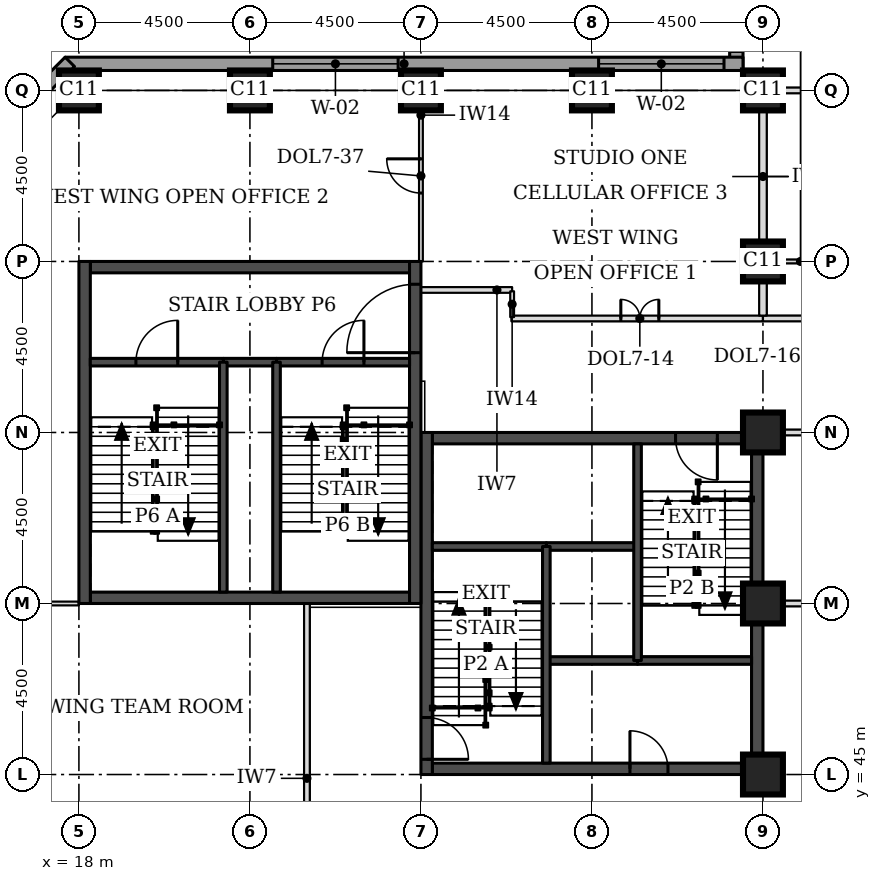
"""IFC4 building model, lengths in metres.
Left out: names, types, materials, properties, quantities, classifications, styles, units other than length and angle.
Written with IfcOpenShell. Run it as: python <this file> out.ifc"""

import sys

from ifc_helpers import new_model, si_unit, direction, frame, frame_2d, origin, origin_2d, place, context, subcontext, project, spatial, rectangle, extrude, element, fill, save


model = new_model("IFC4")
c1 = context("Model", 3, precision=1e-05, world=origin(), true_north=direction((0.0, 1.0)))
c2 = subcontext(c1, "Body", "Model", "MODEL_VIEW")
j1 = project(units=[si_unit("LENGTHUNIT", "METRE"), si_unit("PLANEANGLEUNIT", "RADIAN")], contexts=[c1])
p1 = place(None, origin())
s1 = spatial("IfcSite", under=j1, at=p1, CompositionType="ELEMENT")
p2 = place(p1, origin())
s2 = spatial("IfcBuilding", under=s1, at=p2, CompositionType="ELEMENT")
p3 = place(p2, frame((0.0, 0.0, 130.7)))
s3 = spatial("IfcBuildingStorey", under=s2, at=p3, CompositionType="ELEMENT", Elevation=130.7)
for number, where, z_axis, x_axis in (
    (1, (36.0, 45.0, 0.0), (0.0, 0.0, 1.0), (1.0, 0.0, 0.0)),
    (2, (36.0, 49.5, 0.0), (0.0, 0.0, 1.0), (1.0, 0.0, 0.0)),
    (3, (36.0, 54.0, 0.0), (0.0, 0.0, 1.0), (1.0, 0.0, 0.0)),
    (4, (36.0, 58.5, 0.0), (0.0, 0.0, 1.0), (1.0, 0.0, 0.0)),
    (5, (18.0, 63.0, 0.0), (0.0, 0.0, 1.0), (1.0, 0.0, 0.0)),
    (6, (22.5, 63.0, 0.0), (0.0, 0.0, 1.0), (1.0, 0.0, 0.0)),
    (7, (27.0, 63.0, 0.0), (0.0, 0.0, 1.0), (1.0, 0.0, 0.0)),
    (8, (31.5, 63.0, 0.0), (0.0, 0.0, 1.0), (1.0, 0.0, 0.0)),
    (9, (36.0, 63.0, 0.0), (0.0, 0.0, 1.0), (1.0, 0.0, 0.0)),
):
    element("IfcColumn", number, at=place(p3, frame(where, z_axis=z_axis, x_axis=x_axis)), inside=s3, PredefinedType="COLUMN", context=c2, shape_type="SweptSolid", body=[
        extrude(rectangle(XDim=1.05, YDim=1.05, at=origin_2d()), origin(), (0.0, 0.0, 1.0), 3.7),
    ])
p4 = place(p3, frame((27.3, 45.15, 0.0), z_axis=(0.0, 0.0, 1.0), x_axis=(1.0, 0.0, 0.0)))
e10 = element("IfcWall", 10, at=p4, inside=s3, PredefinedType="SHEAR", context=c2, shape_type="SweptSolid", body=[
    extrude(rectangle(XDim=8.4, YDim=0.3, at=frame_2d((4.2, 0.0))), origin(), (0.0, 0.0, 1.0), 3.7),
])
p5 = place(p4, frame((5.2, 0.0, 0.0)))
e11 = element("IfcOpeningElement", 11, at=p5, cuts=e10, PredefinedType="OPENING", context=c2, shape_type="SweptSolid", body=[
    extrude(rectangle(XDim=1.0, YDim=2.1, at=frame_2d((0.5, 1.05))), frame((0.0, 0.16, 0.0), z_axis=(0.0, -1.0, 0.0), x_axis=(1.0, 0.0, 0.0)), (0.0, 0.0, 1.0), 0.32),
])
p6 = place(p3, frame((27.3, 53.85, 0.0), z_axis=(0.0, 0.0, 1.0), x_axis=(1.0, 0.0, 0.0)))
e12 = element("IfcWall", 12, at=p6, inside=s3, PredefinedType="SHEAR", context=c2, shape_type="SweptSolid", body=[
    extrude(rectangle(XDim=8.4, YDim=0.3, at=frame_2d((4.2, 0.0))), origin(), (0.0, 0.0, 1.0), 3.7),
])
p7 = place(p6, frame((6.4, 0.0, 0.0)))
e13 = element("IfcOpeningElement", 13, at=p7, cuts=e12, PredefinedType="OPENING", context=c2, shape_type="SweptSolid", body=[
    extrude(rectangle(XDim=1.1, YDim=2.1, at=frame_2d((0.55, 1.05))), frame((0.0, 0.16, 0.0), z_axis=(0.0, -1.0, 0.0), x_axis=(1.0, 0.0, 0.0)), (0.0, 0.0, 1.0), 0.32),
])
p8 = place(p3, frame((27.15, 45.0, 0.0), z_axis=(0.0, 0.0, 1.0), x_axis=(0.0, 1.0, 0.0)))
e14 = element("IfcWall", 14, at=p8, inside=s3, PredefinedType="SHEAR", context=c2, shape_type="SweptSolid", body=[
    extrude(rectangle(XDim=9.0, YDim=0.3, at=frame_2d((4.5, 0.0))), origin(), (0.0, 0.0, 1.0), 3.7),
])
p9 = place(p8, frame((0.4, 0.0, 0.0)))
e15 = element("IfcOpeningElement", 15, at=p9, cuts=e14, PredefinedType="OPENING", context=c2, shape_type="SweptSolid", body=[
    extrude(rectangle(XDim=1.1, YDim=2.1, at=frame_2d((0.55, 1.05))), frame((0.0, 0.16, 0.0), z_axis=(0.0, -1.0, 0.0), x_axis=(1.0, 0.0, 0.0)), (0.0, 0.0, 1.0), 0.32),
])
p10 = place(p3, frame((35.85, 45.0, 0.0), z_axis=(0.0, 0.0, 1.0), x_axis=(0.0, 1.0, 0.0)))
e16 = element("IfcWall", 16, at=p10, inside=s3, PredefinedType="SHEAR", context=c2, shape_type="SweptSolid", body=[
    extrude(rectangle(XDim=9.0, YDim=0.3, at=frame_2d((4.5, 0.0))), origin(), (0.0, 0.0, 1.0), 3.7),
])
for number, where, z_axis, x_axis in (
    (17, (18.3, 49.65, 0.0), (0.0, 0.0, 1.0), (1.0, 0.0, 0.0)),
    (18, (18.3, 58.35, 0.0), (0.0, 0.0, 1.0), (1.0, 0.0, 0.0)),
):
    element("IfcWall", number, at=place(p3, frame(where, z_axis=z_axis, x_axis=x_axis)), inside=s3, PredefinedType="SHEAR", context=c2, shape_type="SweptSolid", body=[
        extrude(rectangle(XDim=8.4, YDim=0.3, at=frame_2d((4.2, 0.0))), origin(), (0.0, 0.0, 1.0), 3.7),
    ])
p11 = place(p3, frame((18.15, 49.5, 0.0), z_axis=(0.0, 0.0, 1.0), x_axis=(0.0, 1.0, 0.0)))
e19 = element("IfcWall", 19, at=p11, inside=s3, PredefinedType="SHEAR", context=c2, shape_type="SweptSolid", body=[
    extrude(rectangle(XDim=9.0, YDim=0.3, at=frame_2d((4.5, 0.0))), origin(), (0.0, 0.0, 1.0), 3.7),
])
p12 = place(p3, frame((26.85, 49.5, 0.0), z_axis=(0.0, 0.0, 1.0), x_axis=(0.0, 1.0, 0.0)))
e20 = element("IfcWall", 20, at=p12, inside=s3, PredefinedType="SHEAR", context=c2, shape_type="SweptSolid", body=[
    extrude(rectangle(XDim=9.0, YDim=0.3, at=frame_2d((4.5, 0.0))), origin(), (0.0, 0.0, 1.0), 3.7),
])
p13 = place(p12, frame((6.6, 0.0, 0.0)))
e21 = element("IfcOpeningElement", 21, at=p13, cuts=e20, PredefinedType="OPENING", context=c2, shape_type="SweptSolid", body=[
    extrude(rectangle(XDim=1.8, YDim=2.1, at=frame_2d((0.9, 1.05))), frame((0.0, 0.16, 0.0), z_axis=(0.0, -1.0, 0.0), x_axis=(1.0, 0.0, 0.0)), (0.0, 0.0, 1.0), 0.32),
])
p14 = place(p3, frame((35.3, 76.862, 0.0), z_axis=(0.0, 0.0, 1.0), x_axis=(0.0, -1.0, 0.0)))
e22 = element("IfcWall", 22, at=p14, inside=s3, PredefinedType="STANDARD", context=c2, shape_type="SweptSolid", body=[
    extrude(rectangle(XDim=13.337, YDim=0.35, at=frame_2d((6.669, 0.0))), origin(), (0.0, 0.0, 1.0), 3.525),
])
p15 = place(p14, frame((9.537, 0.0, 0.9)))
e23 = element("IfcOpeningElement", 23, at=p15, cuts=e22, PredefinedType="OPENING", context=c2, shape_type="SweptSolid", body=[
    extrude(rectangle(XDim=3.3, YDim=1.9, at=frame_2d((1.65, 0.95))), frame((0.0, 0.185, 0.0), z_axis=(0.0, -1.0, 0.0), x_axis=(1.0, 0.0, 0.0)), (0.0, 0.0, 1.0), 0.37),
])
p16 = place(p3, frame((35.475, 63.7, 0.0), z_axis=(0.0, 0.0, 1.0), x_axis=(-1.0, 0.0, 0.0)))
e24 = element("IfcWall", 24, at=p16, inside=s3, PredefinedType="STANDARD", context=c2, shape_type="SweptSolid", body=[
    extrude(rectangle(XDim=17.837, YDim=0.35, at=frame_2d((8.919, 0.0))), origin(), (0.0, 0.0, 1.0), 3.525),
])
p17 = place(p16, frame((0.5, 0.0, 0.9)))
e25 = element("IfcOpeningElement", 25, at=p17, cuts=e24, PredefinedType="OPENING", context=c2, shape_type="SweptSolid", body=[
    extrude(rectangle(XDim=3.3, YDim=1.9, at=frame_2d((1.65, 0.95))), frame((0.0, 0.185, 0.0), z_axis=(0.0, -1.0, 0.0), x_axis=(1.0, 0.0, 0.0)), (0.0, 0.0, 1.0), 0.37),
])
p18 = place(p16, frame((9.075, 0.0, 0.9)))
e26 = element("IfcOpeningElement", 26, at=p18, cuts=e24, PredefinedType="OPENING", context=c2, shape_type="SweptSolid", body=[
    extrude(rectangle(XDim=3.3, YDim=1.9, at=frame_2d((1.65, 0.95))), frame((0.0, 0.185, 0.0), z_axis=(0.0, -1.0, 0.0), x_axis=(1.0, 0.0, 0.0)), (0.0, 0.0, 1.0), 0.37),
])
p19 = place(p3, frame((17.761, 63.751, 0.0), z_axis=(0.0, 0.0, 1.0), x_axis=(-0.707106781187, -0.707106781187, 0.0)))
e27 = element("IfcWall", 27, at=p19, inside=s3, PredefinedType="STANDARD", context=c2, shape_type="SweptSolid", body=[
    extrude(rectangle(XDim=7.089, YDim=0.35, at=frame_2d((3.544, 0.0))), origin(), (0.0, 0.0, 1.0), 3.525),
])
p20 = place(p19, frame((1.894, 0.0, 0.9)))
e28 = element("IfcOpeningElement", 28, at=p20, cuts=e27, PredefinedType="OPENING", context=c2, shape_type="SweptSolid", body=[
    extrude(rectangle(XDim=3.3, YDim=1.9, at=frame_2d((1.65, 0.95))), frame((0.0, 0.185, 0.0), z_axis=(0.0, -1.0, 0.0), x_axis=(1.0, 0.0, 0.0)), (0.0, 0.0, 1.0), 0.37),
])
p21 = place(p3, frame((12.749, 44.761, 0.0), z_axis=(0.0, 0.0, 1.0), x_axis=(0.707106781187, -0.707106781187, 0.0)))
e29 = element("IfcWall", 29, at=p21, inside=s3, PredefinedType="STANDARD", context=c2, shape_type="SweptSolid", body=[
    extrude(rectangle(XDim=7.089, YDim=0.35, at=frame_2d((3.544, 0.0))), origin(), (0.0, 0.0, 1.0), 3.525),
])
p22 = place(p21, frame((1.894, 0.0, 0.9)))
e30 = element("IfcOpeningElement", 30, at=p22, cuts=e29, PredefinedType="OPENING", context=c2, shape_type="SweptSolid", body=[
    extrude(rectangle(XDim=3.3, YDim=1.9, at=frame_2d((1.65, 0.95))), frame((0.0, 0.185, 0.0), z_axis=(0.0, -1.0, 0.0), x_axis=(1.0, 0.0, 0.0)), (0.0, 0.0, 1.0), 0.37),
])
for number, where, z_axis, x_axis in (
    (31, (36.525, 49.5, 0.0), (0.0, 0.0, 1.0), (1.0, 0.0, 0.0)),
    (32, (36.525, 54.0, 0.0), (0.0, 0.0, 1.0), (1.0, 0.0, 0.0)),
):
    element("IfcWall", number, at=place(p3, frame(where, z_axis=z_axis, x_axis=x_axis)), inside=s3, PredefinedType="PARTITIONING", context=c2, shape_type="SweptSolid", body=[
        extrude(rectangle(XDim=5.55, YDim=0.15, at=frame_2d((2.775, 0.0))), origin(), (0.0, 0.0, 1.0), 3.55),
    ])
p23 = place(p3, frame((29.38, 57.0, 0.0), z_axis=(0.0, 0.0, 1.0), x_axis=(1.0, 0.0, 0.0)))
e33 = element("IfcWall", 33, at=p23, inside=s3, PredefinedType="PARTITIONING", context=c2, shape_type="SweptSolid", body=[
    extrude(rectangle(XDim=6.62, YDim=0.15, at=frame_2d((3.31, 0.0))), origin(), (0.0, 0.0, 1.0), 3.55),
])
p24 = place(p23, frame((2.88, 0.0, 0.0)))
e34 = element("IfcOpeningElement", 34, at=p24, cuts=e33, PredefinedType="OPENING", context=c2, shape_type="SweptSolid", body=[
    extrude(rectangle(XDim=1.0, YDim=2.1, at=frame_2d((0.5, 1.05))), frame((0.0, 0.085, 0.0), z_axis=(0.0, -1.0, 0.0), x_axis=(1.0, 0.0, 0.0)), (0.0, 0.0, 1.0), 0.17),
])
p25 = place(p3, frame((36.0, 57.0, 0.0), z_axis=(0.0, 0.0, 1.0), x_axis=(1.0, 0.0, 0.0)))
e35 = element("IfcWall", 35, at=p25, inside=s3, PredefinedType="PARTITIONING", context=c2, shape_type="SweptSolid", body=[
    extrude(rectangle(XDim=6.075, YDim=0.15, at=frame_2d((3.038, 0.0))), origin(), (0.0, 0.0, 1.0), 3.55),
])
p26 = place(p25, frame((2.55, 0.0, 0.0)))
e36 = element("IfcOpeningElement", 36, at=p26, cuts=e35, PredefinedType="OPENING", context=c2, shape_type="SweptSolid", body=[
    extrude(rectangle(XDim=1.0, YDim=2.1, at=frame_2d((0.5, 1.05))), frame((0.0, 0.085, 0.0), z_axis=(0.0, -1.0, 0.0), x_axis=(1.0, 0.0, 0.0)), (0.0, 0.0, 1.0), 0.17),
])
p27 = place(p3, frame((36.525, 58.5, 0.0), z_axis=(0.0, 0.0, 1.0), x_axis=(1.0, 0.0, 0.0)))
e37 = element("IfcWall", 37, at=p27, inside=s3, PredefinedType="PARTITIONING", context=c2, shape_type="SweptSolid", body=[
    extrude(rectangle(XDim=2.525, YDim=0.1, at=frame_2d((1.263, 0.0))), origin(), (0.0, 0.0, 1.0), 3.55),
])
p28 = place(p27, frame((0.8, 0.0, 0.0)))
e38 = element("IfcOpeningElement", 38, at=p28, cuts=e37, PredefinedType="OPENING", context=c2, shape_type="SweptSolid", body=[
    extrude(rectangle(XDim=0.9, YDim=2.1, at=frame_2d((0.45, 1.05))), frame((0.0, 0.06, 0.0), z_axis=(0.0, -1.0, 0.0), x_axis=(1.0, 0.0, 0.0)), (0.0, 0.0, 1.0), 0.12),
])
p29 = place(p3, frame((36.525, 63.0, 0.0), z_axis=(0.0, 0.0, 1.0), x_axis=(1.0, 0.0, 0.0)))
e39 = element("IfcWall", 39, at=p29, inside=s3, PredefinedType="PARTITIONING", context=c2, shape_type="SweptSolid", body=[
    extrude(rectangle(XDim=2.4, YDim=0.15, at=frame_2d((1.2, 0.0))), origin(), (0.0, 0.0, 1.0), 3.55),
])
p30 = place(p3, frame((24.0, 43.5, 0.0), z_axis=(0.0, 0.0, 1.0), x_axis=(0.0, 1.0, 0.0)))
e40 = element("IfcWall", 40, at=p30, inside=s3, PredefinedType="PARTITIONING", context=c2, shape_type="SweptSolid", body=[
    extrude(rectangle(XDim=6.0, YDim=0.15, at=frame_2d((3.0, 0.0))), origin(), (0.0, 0.0, 1.0), 3.55),
])
p31 = place(p3, frame((36.0, 57.075, 0.0), z_axis=(0.0, 0.0, 1.0), x_axis=(0.0, 1.0, 0.0)))
e41 = element("IfcWall", 41, at=p31, inside=s3, PredefinedType="PARTITIONING", context=c2, shape_type="SweptSolid", body=[
    extrude(rectangle(XDim=0.9, YDim=0.2, at=frame_2d((0.45, 0.0))), origin(), (0.0, 0.0, 1.0), 2.8),
])
p32 = place(p3, frame((36.0, 58.995, 0.0), z_axis=(0.0, 0.0, 1.0), x_axis=(0.0, 1.0, 0.0)))
e42 = element("IfcWall", 42, at=p32, inside=s3, PredefinedType="PARTITIONING", context=c2, shape_type="SweptSolid", body=[
    extrude(rectangle(XDim=3.48, YDim=0.2, at=frame_2d((1.74, 0.0))), origin(), (0.0, 0.0, 1.0), 2.8),
])
p33 = place(p3, frame((27.0, 63.0, 0.0), z_axis=(0.0, 0.0, 1.0), x_axis=(0.0, -1.0, 0.0)))
e43 = element("IfcWall", 43, at=p33, inside=s3, PredefinedType="PARTITIONING", context=c2, shape_type="SweptSolid", body=[
    extrude(rectangle(XDim=4.5, YDim=0.1, at=frame_2d((2.25, 0.0))), origin(), (0.0, 0.0, 1.0), 3.55),
])
p34 = place(p33, frame((1.8, 0.0, 0.0)))
e44 = element("IfcOpeningElement", 44, at=p34, cuts=e43, PredefinedType="OPENING", context=c2, shape_type="SweptSolid", body=[
    extrude(rectangle(XDim=0.9, YDim=2.1, at=frame_2d((0.45, 1.05))), frame((0.0, 0.06, 0.0), z_axis=(0.0, -1.0, 0.0), x_axis=(1.0, 0.0, 0.0)), (0.0, 0.0, 1.0), 0.12),
])
p35 = place(p3, frame((13.5, 49.5, 0.0), z_axis=(0.0, 0.0, 1.0), x_axis=(1.0, 0.0, 0.0)))
e45 = element("IfcWall", 45, at=p35, inside=s3, PredefinedType="PARTITIONING", context=c2, shape_type="SweptSolid", body=[
    extrude(rectangle(XDim=4.5, YDim=0.1, at=frame_2d((2.25, 0.0))), origin(), (0.0, 0.0, 1.0), 3.55),
])
p36 = place(p35, frame((1.8, 0.0, 0.0)))
e46 = element("IfcOpeningElement", 46, at=p36, cuts=e45, PredefinedType="OPENING", context=c2, shape_type="SweptSolid", body=[
    extrude(rectangle(XDim=0.9, YDim=2.1, at=frame_2d((0.45, 1.05))), frame((0.0, 0.06, 0.0), z_axis=(0.0, -1.0, 0.0), x_axis=(1.0, 0.0, 0.0)), (0.0, 0.0, 1.0), 0.12),
])
p37 = place(p3, frame((27.0, 57.75, 0.0), z_axis=(0.0, 0.0, 1.0), x_axis=(1.0, 0.0, 0.0)))
e47 = element("IfcWall", 47, at=p37, inside=s3, PredefinedType="PARTITIONING", context=c2, shape_type="SweptSolid", body=[
    extrude(rectangle(XDim=2.4, YDim=0.15, at=frame_2d((1.2, 0.0))), origin(), (0.0, 0.0, 1.0), 3.55),
])
p38 = place(p3, frame((29.4, 57.715, 0.0), z_axis=(0.0, 0.0, 1.0), x_axis=(0.0, -1.0, 0.0)))
e48 = element("IfcWall", 48, at=p38, inside=s3, PredefinedType="PARTITIONING", context=c2, shape_type="SweptSolid", body=[
    extrude(rectangle(XDim=0.68, YDim=0.1, at=frame_2d((0.34, 0.0))), origin(), (0.0, 0.0, 1.0), 3.55),
])
p39 = place(p3, frame((30.3, 48.0, 0.0), z_axis=(0.0, 0.0, 1.0), x_axis=(1.0, 0.0, 0.0)))
e49 = element("IfcWall", 49, at=p39, inside=s3, PredefinedType="SOLIDWALL", context=c2, shape_type="SweptSolid", body=[
    extrude(rectangle(XDim=2.4, YDim=0.2, at=frame_2d((1.2, 0.0))), origin(), (0.0, 0.0, 1.0), 3.55),
])
p40 = place(p3, frame((32.7, 48.0, 0.0), z_axis=(0.0, 0.0, 1.0), x_axis=(1.0, 0.0, 0.0)))
e50 = element("IfcWall", 50, at=p40, inside=s3, PredefinedType="SOLIDWALL", context=c2, shape_type="SweptSolid", body=[
    extrude(rectangle(XDim=3.0, YDim=0.2, at=frame_2d((1.5, 0.0))), origin(), (0.0, 0.0, 1.0), 3.55),
])
p41 = place(p3, frame((30.3, 51.0, 0.0), z_axis=(0.0, 0.0, 1.0), x_axis=(1.0, 0.0, 0.0)))
e51 = element("IfcWall", 51, at=p41, inside=s3, PredefinedType="SOLIDWALL", context=c2, shape_type="SweptSolid", body=[
    extrude(rectangle(XDim=2.4, YDim=0.2, at=frame_2d((1.2, 0.0))), origin(), (0.0, 0.0, 1.0), 3.7),
])
p42 = place(p3, frame((27.3, 51.0, 0.0), z_axis=(0.0, 0.0, 1.0), x_axis=(1.0, 0.0, 0.0)))
e52 = element("IfcWall", 52, at=p42, inside=s3, PredefinedType="SOLIDWALL", context=c2, shape_type="SweptSolid", body=[
    extrude(rectangle(XDim=3.0, YDim=0.2, at=frame_2d((1.5, 0.0))), origin(), (0.0, 0.0, 1.0), 3.55),
])
for number, where, z_axis, x_axis in (
    (53, (30.3, 45.3, 0.0), (0.0, 0.0, 1.0), (0.0, 1.0, 0.0)),
    (54, (32.7, 48.0, 0.0), (0.0, 0.0, 1.0), (0.0, 1.0, 0.0)),
):
    element("IfcWall", number, at=place(p3, frame(where, z_axis=z_axis, x_axis=x_axis)), inside=s3, PredefinedType="SOLIDWALL", context=c2, shape_type="SweptSolid", body=[
        extrude(rectangle(XDim=5.7, YDim=0.2, at=frame_2d((2.85, 0.0))), origin(), (0.0, 0.0, 1.0), 3.55),
    ])
p43 = place(p3, frame((21.8, 55.85, 0.0), z_axis=(0.0, 0.0, 1.0), x_axis=(1.0, 0.0, 0.0)))
e55 = element("IfcWall", 55, at=p43, inside=s3, PredefinedType="SOLIDWALL", context=c2, shape_type="SweptSolid", body=[
    extrude(rectangle(XDim=1.4, YDim=0.2, at=frame_2d((0.7, 0.0))), origin(), (0.0, 0.0, 1.0), 3.55),
])
p44 = place(p3, frame((18.3, 55.85, 0.0), z_axis=(0.0, 0.0, 1.0), x_axis=(1.0, 0.0, 0.0)))
e56 = element("IfcWall", 56, at=p44, inside=s3, PredefinedType="SOLIDWALL", context=c2, shape_type="SweptSolid", body=[
    extrude(rectangle(XDim=3.5, YDim=0.2, at=frame_2d((1.75, 0.0))), origin(), (0.0, 0.0, 1.0), 3.55),
])
p45 = place(p44, frame((1.2, 0.0, 0.0)))
e57 = element("IfcOpeningElement", 57, at=p45, cuts=e56, PredefinedType="OPENING", context=c2, shape_type="SweptSolid", body=[
    extrude(rectangle(XDim=1.1, YDim=2.1, at=frame_2d((0.55, 1.05))), frame((0.0, 0.11, 0.0), z_axis=(0.0, -1.0, 0.0), x_axis=(1.0, 0.0, 0.0)), (0.0, 0.0, 1.0), 0.22),
])
p46 = place(p3, frame((23.2, 55.85, 0.0), z_axis=(0.0, 0.0, 1.0), x_axis=(1.0, 0.0, 0.0)))
e58 = element("IfcWall", 58, at=p46, inside=s3, PredefinedType="SOLIDWALL", context=c2, shape_type="SweptSolid", body=[
    extrude(rectangle(XDim=3.5, YDim=0.2, at=frame_2d((1.75, 0.0))), origin(), (0.0, 0.0, 1.0), 3.55),
])
p47 = place(p46, frame((1.2, 0.0, 0.0)))
e59 = element("IfcOpeningElement", 59, at=p47, cuts=e58, PredefinedType="OPENING", context=c2, shape_type="SweptSolid", body=[
    extrude(rectangle(XDim=1.1, YDim=2.1, at=frame_2d((0.55, 1.05))), frame((0.0, 0.11, 0.0), z_axis=(0.0, -1.0, 0.0), x_axis=(1.0, 0.0, 0.0)), (0.0, 0.0, 1.0), 0.22),
])
for number, where, z_axis, x_axis in (
    (60, (21.8, 49.8, 0.0), (0.0, 0.0, 1.0), (0.0, 1.0, 0.0)),
    (61, (23.2, 49.8, 0.0), (0.0, 0.0, 1.0), (0.0, 1.0, 0.0)),
):
    element("IfcWall", number, at=place(p3, frame(where, z_axis=z_axis, x_axis=x_axis)), inside=s3, PredefinedType="SOLIDWALL", context=c2, shape_type="SweptSolid", body=[
        extrude(rectangle(XDim=6.05, YDim=0.2, at=frame_2d((3.025, 0.0))), origin(), (0.0, 0.0, 1.0), 3.55),
    ])
p48 = place(p17, origin())
e62 = element("IfcWindow", 62, at=p48, inside=s3, PartitioningType="SINGLE_PANEL", PredefinedType="WINDOW", context=c2, shape_type="SweptSolid", body=[
    extrude(rectangle(XDim=3.3, YDim=1.9, at=frame_2d((1.65, 0.95))), frame((0.0, 0.085, 0.0), z_axis=(0.0, -1.0, 0.0), x_axis=(1.0, 0.0, 0.0)), (0.0, 0.0, 1.0), 0.06),
])
fill(e25, e62)
p49 = place(p18, origin())
e63 = element("IfcWindow", 63, at=p49, inside=s3, PartitioningType="SINGLE_PANEL", PredefinedType="WINDOW", context=c2, shape_type="SweptSolid", body=[
    extrude(rectangle(XDim=3.3, YDim=1.9, at=frame_2d((1.65, 0.95))), frame((0.0, 0.085, 0.0), z_axis=(0.0, -1.0, 0.0), x_axis=(1.0, 0.0, 0.0)), (0.0, 0.0, 1.0), 0.06),
])
fill(e26, e63)
p50 = place(p24, origin())
e64 = element("IfcDoor", 64, at=p50, inside=s3, OperationType="DOUBLE_DOOR_SINGLE_SWING", PredefinedType="DOOR", context=c2, shape_type="SweptSolid", body=[
    extrude(rectangle(XDim=1.0, YDim=2.1, at=frame_2d((0.5, 1.05))), frame((0.0, 0.025, 0.0), z_axis=(0.0, -1.0, 0.0), x_axis=(1.0, 0.0, 0.0)), (0.0, 0.0, 1.0), 0.05),
])
fill(e34, e64)
p51 = place(p34, frame((0.9, 0.0, 0.0), z_axis=(0.0, 0.0, 1.0), x_axis=(-1.0, 0.0, 0.0)))
e65 = element("IfcDoor", 65, at=p51, inside=s3, OperationType="SINGLE_SWING_RIGHT", PredefinedType="DOOR", context=c2, shape_type="SweptSolid", body=[
    extrude(rectangle(XDim=0.9, YDim=2.1, at=frame_2d((0.45, 1.05))), frame((0.0, 0.025, 0.0), z_axis=(0.0, -1.0, 0.0), x_axis=(1.0, 0.0, 0.0)), (0.0, 0.0, 1.0), 0.05),
])
fill(e44, e65)
p52 = place(p9, frame((1.1, 0.0, 0.0), z_axis=(0.0, 0.0, 1.0), x_axis=(-1.0, 0.0, 0.0)))
e66 = element("IfcDoor", 66, at=p52, inside=s3, OperationType="SINGLE_SWING_RIGHT", PredefinedType="DOOR", context=c2, shape_type="SweptSolid", body=[
    extrude(rectangle(XDim=1.1, YDim=2.1, at=frame_2d((0.55, 1.05))), frame((0.0, 0.025, 0.0), z_axis=(0.0, -1.0, 0.0), x_axis=(1.0, 0.0, 0.0)), (0.0, 0.0, 1.0), 0.05),
])
fill(e15, e66)
p53 = place(p7, frame((1.1, 0.0, 0.0), z_axis=(0.0, 0.0, 1.0), x_axis=(-1.0, 0.0, 0.0)))
e67 = element("IfcDoor", 67, at=p53, inside=s3, OperationType="SINGLE_SWING_LEFT", PredefinedType="DOOR", context=c2, shape_type="SweptSolid", body=[
    extrude(rectangle(XDim=1.1, YDim=2.1, at=frame_2d((0.55, 1.05))), frame((0.0, 0.025, 0.0), z_axis=(0.0, -1.0, 0.0), x_axis=(1.0, 0.0, 0.0)), (0.0, 0.0, 1.0), 0.05),
])
fill(e13, e67)
p54 = place(p5, origin())
e68 = element("IfcDoor", 68, at=p54, inside=s3, OperationType="SINGLE_SWING_LEFT", PredefinedType="DOOR", context=c2, shape_type="SweptSolid", body=[
    extrude(rectangle(XDim=1.0, YDim=2.1, at=frame_2d((0.5, 1.05))), frame((0.0, 0.025, 0.0), z_axis=(0.0, -1.0, 0.0), x_axis=(1.0, 0.0, 0.0)), (0.0, 0.0, 1.0), 0.05),
])
fill(e11, e68)
p55 = place(p45, origin())
e69 = element("IfcDoor", 69, at=p55, inside=s3, OperationType="SINGLE_SWING_RIGHT", PredefinedType="DOOR", context=c2, shape_type="SweptSolid", body=[
    extrude(rectangle(XDim=1.1, YDim=2.1, at=frame_2d((0.55, 1.05))), frame((0.0, 0.025, 0.0), z_axis=(0.0, -1.0, 0.0), x_axis=(1.0, 0.0, 0.0)), (0.0, 0.0, 1.0), 0.05),
])
fill(e57, e69)
p56 = place(p47, origin())
e70 = element("IfcDoor", 70, at=p56, inside=s3, OperationType="SINGLE_SWING_RIGHT", PredefinedType="DOOR", context=c2, shape_type="SweptSolid", body=[
    extrude(rectangle(XDim=1.1, YDim=2.1, at=frame_2d((0.55, 1.05))), frame((0.0, 0.025, 0.0), z_axis=(0.0, -1.0, 0.0), x_axis=(1.0, 0.0, 0.0)), (0.0, 0.0, 1.0), 0.05),
])
fill(e59, e70)
p57 = place(p13, origin())
e71 = element("IfcDoor", 71, at=p57, inside=s3, OperationType="SINGLE_SWING_LEFT", PredefinedType="DOOR", context=c2, shape_type="SweptSolid", body=[
    extrude(rectangle(XDim=1.8, YDim=2.1, at=frame_2d((0.9, 1.05))), frame((0.0, 0.025, 0.0), z_axis=(0.0, -1.0, 0.0), x_axis=(1.0, 0.0, 0.0)), (0.0, 0.0, 1.0), 0.05),
])
fill(e21, e71)
save(model, sys.argv[1])
